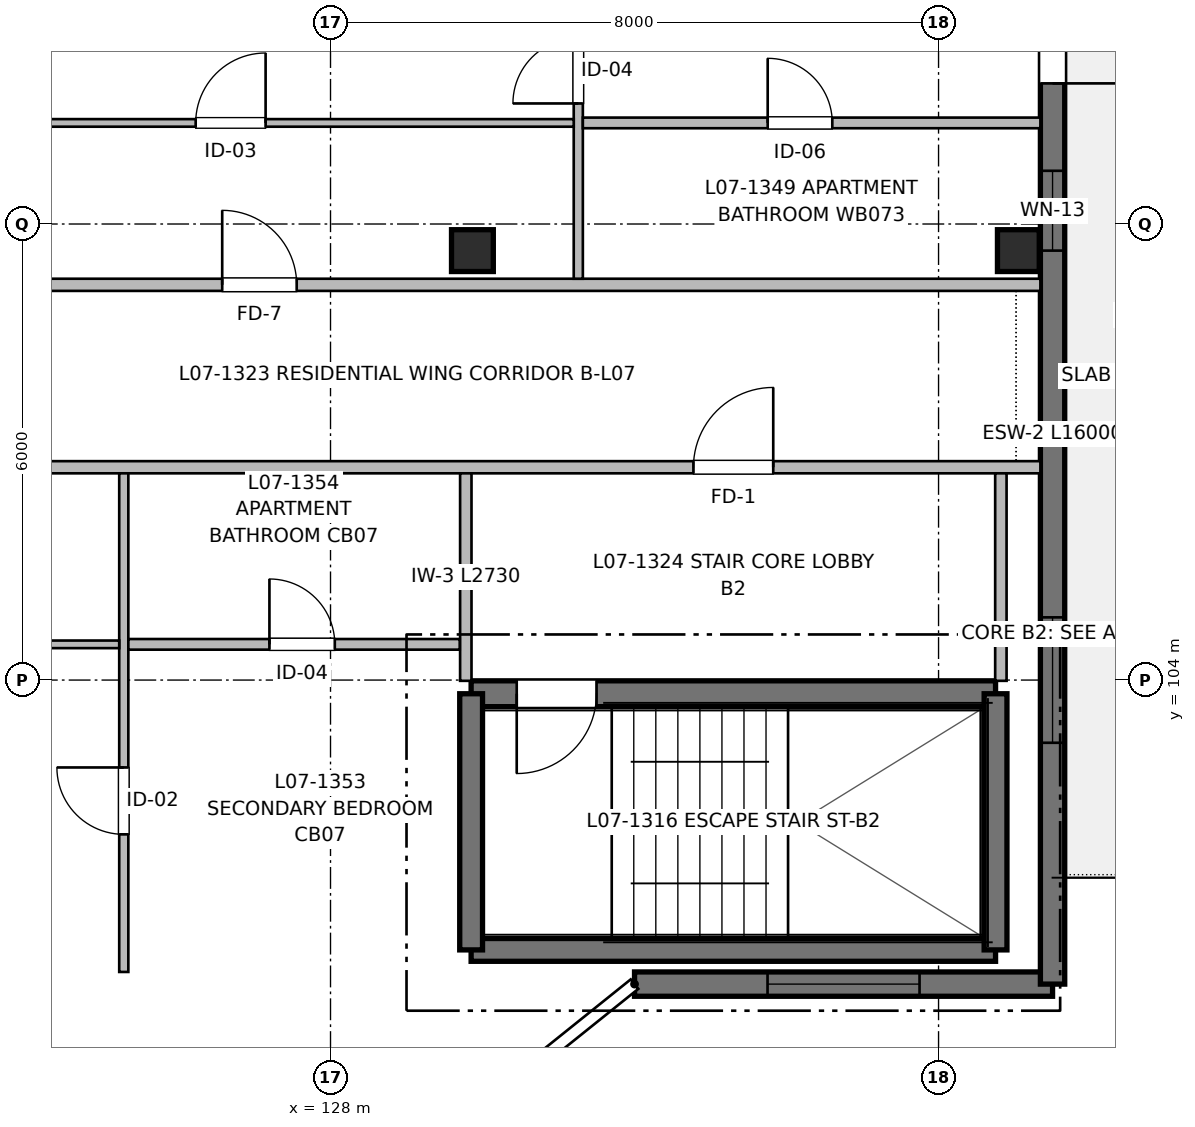
"""IFC4 building model, lengths in metres.
Left out: names, types, materials, properties, quantities, classifications, styles, units other than length and angle.
Written with IfcOpenShell. Run it as: python <this file> out.ifc"""

import sys

from ifc_helpers import new_model, si_unit, direction, frame, frame_2d, origin, origin_2d, place, context, subcontext, project, spatial, rectangle, extrude, element, fill, save


model = new_model("IFC4")
c1 = context("Model", 3, precision=1e-05, world=origin(), true_north=direction((0.0, 1.0)))
c2 = subcontext(c1, "Body", "Model", "MODEL_VIEW")
j1 = project(units=[si_unit("LENGTHUNIT", "METRE"), si_unit("PLANEANGLEUNIT", "RADIAN")], contexts=[c1])
p1 = place(None, origin())
s1 = spatial("IfcSite", under=j1, at=p1, CompositionType="ELEMENT")
p2 = place(p1, origin())
s2 = spatial("IfcBuilding", under=s1, at=p2, CompositionType="ELEMENT")
p3 = place(p2, frame((0.0, 0.0, 23.36)))
s3 = spatial("IfcBuildingStorey", under=s2, at=p3, CompositionType="ELEMENT", Elevation=23.36)
for number, where, z_axis, x_axis in (
    (1, (129.867, 109.65, 0.0), (0.0, 0.0, 1.0), (1.0, 0.0, 0.0)),
    (2, (137.05, 109.65, 0.0), (0.0, 0.0, 1.0), (1.0, 0.0, 0.0)),
):
    element("IfcColumn", number, at=place(p3, frame(where, z_axis=z_axis, x_axis=x_axis)), inside=s3, PredefinedType="COLUMN", context=c2, shape_type="SweptSolid", body=[
        extrude(rectangle(XDim=0.55, YDim=0.55, at=origin_2d()), origin(), (0.0, 0.0, 1.0), 3.2),
    ])
p4 = place(p3, frame((129.85, 100.45, 0.0), z_axis=(0.0, 0.0, 1.0), x_axis=(1.0, 0.0, 0.0)))
e3 = element("IfcWall", 3, at=p4, inside=s3, PredefinedType="SHEAR", context=c2, shape_type="SweptSolid", body=[
    extrude(rectangle(XDim=6.9, YDim=0.3, at=frame_2d((3.45, 0.0))), origin(), (0.0, 0.0, 1.0), 3.2),
])
p5 = place(p3, frame((136.75, 103.82, 0.0), z_axis=(0.0, 0.0, 1.0), x_axis=(-1.0, 0.0, 0.0)))
e4 = element("IfcWall", 4, at=p5, inside=s3, PredefinedType="SHEAR", context=c2, shape_type="SweptSolid", body=[
    extrude(rectangle(XDim=6.9, YDim=0.34, at=frame_2d((3.45, 0.0))), origin(), (0.0, 0.0, 1.0), 3.2),
])
p6 = place(p5, frame((5.25, 0.0, 0.0)))
e5 = element("IfcOpeningElement", 5, at=p6, cuts=e4, PredefinedType="OPENING", context=c2, shape_type="SweptSolid", body=[
    extrude(rectangle(XDim=1.05, YDim=2.15, at=frame_2d((0.525, 1.075))), frame((0.0, 0.18, 0.0), z_axis=(0.0, -1.0, 0.0), x_axis=(1.0, 0.0, 0.0)), (0.0, 0.0, 1.0), 0.36),
])
for number, where, z_axis, x_axis in (
    (6, (129.85, 103.82, 0.0), (0.0, 0.0, 1.0), (0.0, -1.0, 0.0)),
    (7, (136.75, 100.45, 0.0), (0.0, 0.0, 1.0), (0.0, 1.0, 0.0)),
):
    element("IfcWall", number, at=place(p3, frame(where, z_axis=z_axis, x_axis=x_axis)), inside=s3, PredefinedType="SHEAR", context=c2, shape_type="SweptSolid", body=[
        extrude(rectangle(XDim=3.37, YDim=0.3, at=frame_2d((1.685, 0.0))), origin(), (0.0, 0.0, 1.0), 3.2),
    ])
p7 = place(p3, frame((137.5, 100.0, 0.0), z_axis=(0.0, 0.0, 1.0), x_axis=(-1.0, 0.0, 0.0)))
e8 = element("IfcWall", 8, at=p7, inside=s3, PredefinedType="SHEAR", context=c2, shape_type="SweptSolid", body=[
    extrude(rectangle(XDim=5.5, YDim=0.32, at=frame_2d((2.75, 0.0))), origin(), (0.0, 0.0, 1.0), 2.98),
])
p8 = place(p7, frame((1.75, 0.0, 0.72)))
e9 = element("IfcOpeningElement", 9, at=p8, cuts=e8, PredefinedType="OPENING", context=c2, shape_type="SweptSolid", body=[
    extrude(rectangle(XDim=2.0, YDim=1.5, at=frame_2d((1.0, 0.75))), frame((0.0, 0.17, 0.0), z_axis=(0.0, -1.0, 0.0), x_axis=(1.0, 0.0, 0.0)), (0.0, 0.0, 1.0), 0.34),
])
p9 = place(p3, frame((137.5, 116.0, 0.0), z_axis=(0.0, 0.0, 1.0), x_axis=(0.0, -1.0, 0.0)))
e10 = element("IfcWall", 10, at=p9, inside=s3, PredefinedType="SHEAR", context=c2, shape_type="SweptSolid", body=[
    extrude(rectangle(XDim=16.0, YDim=0.32, at=frame_2d((8.0, 0.0))), origin(), (0.0, 0.0, 1.0), 2.98),
])
p10 = place(p9, frame((2.95, 0.0, 0.0)))
e11 = element("IfcOpeningElement", 11, at=p10, cuts=e10, PredefinedType="OPENING", context=c2, shape_type="SweptSolid", body=[
    extrude(rectangle(XDim=1.2, YDim=2.2, at=frame_2d((0.6, 1.1))), frame((0.0, 0.17, 0.0), z_axis=(0.0, -1.0, 0.0), x_axis=(1.0, 0.0, 0.0)), (0.0, 0.0, 1.0), 0.34),
])
p11 = place(p9, frame((5.3, 0.0, 0.9)))
e12 = element("IfcOpeningElement", 12, at=p11, cuts=e10, PredefinedType="OPENING", context=c2, shape_type="SweptSolid", body=[
    extrude(rectangle(XDim=1.05, YDim=1.15, at=frame_2d((0.525, 0.575))), frame((0.0, 0.17, 0.0), z_axis=(0.0, -1.0, 0.0), x_axis=(1.0, 0.0, 0.0)), (0.0, 0.0, 1.0), 0.34),
])
p12 = place(p9, frame((11.175, 0.0, 0.77)))
e13 = element("IfcOpeningElement", 13, at=p12, cuts=e10, PredefinedType="OPENING", context=c2, shape_type="SweptSolid", body=[
    extrude(rectangle(XDim=1.65, YDim=1.45, at=frame_2d((0.825, 0.725))), frame((0.0, 0.17, 0.0), z_axis=(0.0, -1.0, 0.0), x_axis=(1.0, 0.0, 0.0)), (0.0, 0.0, 1.0), 0.34),
])
p13 = place(p3, frame((113.2, 106.8, 0.0), z_axis=(0.0, 0.0, 1.0), x_axis=(1.0, 0.0, 0.0)))
e14 = element("IfcWall", 14, at=p13, inside=s3, PredefinedType="PARTITIONING", context=c2, shape_type="SweptSolid", body=[
    extrude(rectangle(XDim=24.14, YDim=0.16, at=frame_2d((12.07, 0.0))), origin(), (0.0, 0.0, 1.0), 2.935),
])
p14 = place(p13, frame((19.575, 0.0, 0.0)))
e15 = element("IfcOpeningElement", 15, at=p14, cuts=e14, PredefinedType="OPENING", context=c2, shape_type="SweptSolid", body=[
    extrude(rectangle(XDim=1.05, YDim=2.15, at=frame_2d((0.525, 1.075))), frame((0.0, 0.09, 0.0), z_axis=(0.0, -1.0, 0.0), x_axis=(1.0, 0.0, 0.0)), (0.0, 0.0, 1.0), 0.18),
])
p15 = place(p13, frame((8.995, 0.0, 0.0)))
e16 = element("IfcOpeningElement", 16, at=p15, cuts=e14, PredefinedType="OPENING", context=c2, shape_type="SweptSolid", body=[
    extrude(rectangle(XDim=0.98, YDim=2.15, at=frame_2d((0.49, 1.075))), frame((0.0, 0.09, 0.0), z_axis=(0.0, -1.0, 0.0), x_axis=(1.0, 0.0, 0.0)), (0.0, 0.0, 1.0), 0.18),
])
p16 = place(p3, frame((93.66, 109.2, 0.0), z_axis=(0.0, 0.0, 1.0), x_axis=(1.0, 0.0, 0.0)))
e17 = element("IfcWall", 17, at=p16, inside=s3, PredefinedType="PARTITIONING", context=c2, shape_type="SweptSolid", body=[
    extrude(rectangle(XDim=43.68, YDim=0.16, at=frame_2d((21.84, 0.0))), origin(), (0.0, 0.0, 1.0), 2.935),
])
p17 = place(p16, frame((3.705, 0.0, 0.0)))
e18 = element("IfcOpeningElement", 18, at=p17, cuts=e17, PredefinedType="OPENING", context=c2, shape_type="SweptSolid", body=[
    extrude(rectangle(XDim=0.98, YDim=2.15, at=frame_2d((0.49, 1.075))), frame((0.0, 0.09, 0.0), z_axis=(0.0, -1.0, 0.0), x_axis=(1.0, 0.0, 0.0)), (0.0, 0.0, 1.0), 0.18),
])
p18 = place(p16, frame((18.33, 0.0, 0.0)))
e19 = element("IfcOpeningElement", 19, at=p18, cuts=e17, PredefinedType="OPENING", context=c2, shape_type="SweptSolid", body=[
    extrude(rectangle(XDim=0.98, YDim=2.15, at=frame_2d((0.49, 1.075))), frame((0.0, 0.09, 0.0), z_axis=(0.0, -1.0, 0.0), x_axis=(1.0, 0.0, 0.0)), (0.0, 0.0, 1.0), 0.18),
])
p19 = place(p16, frame((32.915, 0.0, 0.0)))
e20 = element("IfcOpeningElement", 20, at=p19, cuts=e17, PredefinedType="OPENING", context=c2, shape_type="SweptSolid", body=[
    extrude(rectangle(XDim=0.98, YDim=2.15, at=frame_2d((0.49, 1.075))), frame((0.0, 0.09, 0.0), z_axis=(0.0, -1.0, 0.0), x_axis=(1.0, 0.0, 0.0)), (0.0, 0.0, 1.0), 0.18),
])
for number, where, z_axis, x_axis in (
    (21, (129.78, 103.99, 0.0), (0.0, 0.0, 1.0), (0.0, 1.0, 0.0)),
    (22, (136.82, 103.99, 0.0), (0.0, 0.0, 1.0), (0.0, 1.0, 0.0)),
):
    element("IfcWall", number, at=place(p3, frame(where, z_axis=z_axis, x_axis=x_axis)), inside=s3, PredefinedType="PARTITIONING", context=c2, shape_type="SweptSolid", body=[
        extrude(rectangle(XDim=2.73, YDim=0.15, at=frame_2d((1.365, 0.0))), origin(), (0.0, 0.0, 1.0), 2.935),
    ])
p20 = place(p3, frame((131.26, 109.28, 0.0), z_axis=(0.0, 0.0, 1.0), x_axis=(0.0, 1.0, 0.0)))
e23 = element("IfcWall", 23, at=p20, inside=s3, PredefinedType="PARTITIONING", context=c2, shape_type="SweptSolid", body=[
    extrude(rectangle(XDim=6.6, YDim=0.12, at=frame_2d((3.3, 0.0))), origin(), (0.0, 0.0, 1.0), 2.935),
])
p21 = place(p20, frame((2.306, 0.0, 0.0)))
e24 = element("IfcOpeningElement", 24, at=p21, cuts=e23, PredefinedType="OPENING", context=c2, shape_type="SweptSolid", body=[
    extrude(rectangle(XDim=0.86, YDim=2.1, at=frame_2d((0.43, 1.05))), frame((0.0, 0.07, 0.0), z_axis=(0.0, -1.0, 0.0), x_axis=(1.0, 0.0, 0.0)), (0.0, 0.0, 1.0), 0.14),
])
p22 = place(p20, frame((4.097, 0.0, 0.0)))
e25 = element("IfcOpeningElement", 25, at=p22, cuts=e23, PredefinedType="OPENING", context=c2, shape_type="SweptSolid", body=[
    extrude(rectangle(XDim=0.9, YDim=2.1, at=frame_2d((0.45, 1.05))), frame((0.0, 0.07, 0.0), z_axis=(0.0, -1.0, 0.0), x_axis=(1.0, 0.0, 0.0)), (0.0, 0.0, 1.0), 0.14),
])
p23 = place(p3, frame((131.32, 111.33, 0.0), z_axis=(0.0, 0.0, 1.0), x_axis=(1.0, 0.0, 0.0)))
e26 = element("IfcWall", 26, at=p23, inside=s3, PredefinedType="PARTITIONING", context=c2, shape_type="SweptSolid", body=[
    extrude(rectangle(XDim=6.02, YDim=0.14, at=frame_2d((3.01, 0.0))), origin(), (0.0, 0.0, 1.0), 2.935),
])
p24 = place(p23, frame((2.432, 0.0, 0.0)))
e27 = element("IfcOpeningElement", 27, at=p24, cuts=e26, PredefinedType="OPENING", context=c2, shape_type="SweptSolid", body=[
    extrude(rectangle(XDim=0.85, YDim=2.05, at=frame_2d((0.425, 1.025))), frame((0.0, 0.08, 0.0), z_axis=(0.0, -1.0, 0.0), x_axis=(1.0, 0.0, 0.0)), (0.0, 0.0, 1.0), 0.16),
])
p25 = place(p3, frame((122.87, 111.33, 0.0), z_axis=(0.0, 0.0, 1.0), x_axis=(1.0, 0.0, 0.0)))
e28 = element("IfcWall", 28, at=p25, inside=s3, PredefinedType="PARTITIONING", context=c2, shape_type="SweptSolid", body=[
    extrude(rectangle(XDim=8.33, YDim=0.1, at=frame_2d((4.165, 0.0))), origin(), (0.0, 0.0, 1.0), 2.935),
])
p26 = place(p25, frame((3.356, 0.0, 0.0)))
e29 = element("IfcOpeningElement", 29, at=p26, cuts=e28, PredefinedType="OPENING", context=c2, shape_type="SweptSolid", body=[
    extrude(rectangle(XDim=0.92, YDim=2.1, at=frame_2d((0.46, 1.05))), frame((0.0, 0.06, 0.0), z_axis=(0.0, -1.0, 0.0), x_axis=(1.0, 0.0, 0.0)), (0.0, 0.0, 1.0), 0.12),
])
p27 = place(p3, frame((125.28, 100.16, 0.0), z_axis=(0.0, 0.0, 1.0), x_axis=(0.0, 1.0, 0.0)))
e30 = element("IfcWall", 30, at=p27, inside=s3, PredefinedType="PARTITIONING", context=c2, shape_type="SweptSolid", body=[
    extrude(rectangle(XDim=6.56, YDim=0.12, at=frame_2d((3.28, 0.0))), origin(), (0.0, 0.0, 1.0), 2.935),
])
p28 = place(p27, frame((1.81, 0.0, 0.0)))
e31 = element("IfcOpeningElement", 31, at=p28, cuts=e30, PredefinedType="OPENING", context=c2, shape_type="SweptSolid", body=[
    extrude(rectangle(XDim=0.88, YDim=2.1, at=frame_2d((0.44, 1.05))), frame((0.0, 0.07, 0.0), z_axis=(0.0, -1.0, 0.0), x_axis=(1.0, 0.0, 0.0)), (0.0, 0.0, 1.0), 0.14),
])
p29 = place(p3, frame((125.34, 104.47, 0.0), z_axis=(0.0, 0.0, 1.0), x_axis=(1.0, 0.0, 0.0)))
e32 = element("IfcWall", 32, at=p29, inside=s3, PredefinedType="PARTITIONING", context=c2, shape_type="SweptSolid", body=[
    extrude(rectangle(XDim=4.36, YDim=0.14, at=frame_2d((2.18, 0.0))), origin(), (0.0, 0.0, 1.0), 2.935),
])
p30 = place(p29, frame((1.856, 0.0, 0.0)))
e33 = element("IfcOpeningElement", 33, at=p30, cuts=e32, PredefinedType="OPENING", context=c2, shape_type="SweptSolid", body=[
    extrude(rectangle(XDim=0.86, YDim=2.1, at=frame_2d((0.43, 1.05))), frame((0.0, 0.08, 0.0), z_axis=(0.0, -1.0, 0.0), x_axis=(1.0, 0.0, 0.0)), (0.0, 0.0, 1.0), 0.16),
])
p31 = place(p3, frame((120.09, 104.47, 0.0), z_axis=(0.0, 0.0, 1.0), x_axis=(1.0, 0.0, 0.0)))
e34 = element("IfcWall", 34, at=p31, inside=s3, PredefinedType="PARTITIONING", context=c2, shape_type="SweptSolid", body=[
    extrude(rectangle(XDim=5.13, YDim=0.1, at=frame_2d((2.565, 0.0))), origin(), (0.0, 0.0, 1.0), 2.935),
])
p32 = place(p31, frame((2.18, 0.0, 0.0)))
e35 = element("IfcOpeningElement", 35, at=p32, cuts=e34, PredefinedType="OPENING", context=c2, shape_type="SweptSolid", body=[
    extrude(rectangle(XDim=0.92, YDim=2.1, at=frame_2d((0.46, 1.05))), frame((0.0, 0.06, 0.0), z_axis=(0.0, -1.0, 0.0), x_axis=(1.0, 0.0, 0.0)), (0.0, 0.0, 1.0), 0.12),
])
p33 = place(p6, origin())
e36 = element("IfcDoor", 36, at=p33, inside=s3, OperationType="SINGLE_SWING_RIGHT", PredefinedType="DOOR", context=c2, shape_type="SweptSolid", body=[
    extrude(rectangle(XDim=1.05, YDim=2.15, at=frame_2d((0.525, 1.075))), frame((0.0, 0.025, 0.0), z_axis=(0.0, -1.0, 0.0), x_axis=(1.0, 0.0, 0.0)), (0.0, 0.0, 1.0), 0.05),
])
fill(e5, e36)
p34 = place(p8, origin())
e37 = element("IfcWindow", 37, at=p34, inside=s3, PartitioningType="SINGLE_PANEL", PredefinedType="WINDOW", context=c2, shape_type="SweptSolid", body=[
    extrude(rectangle(XDim=2.0, YDim=1.5, at=frame_2d((1.0, 0.75))), frame((0.0, 0.03, 0.0), z_axis=(0.0, -1.0, 0.0), x_axis=(1.0, 0.0, 0.0)), (0.0, 0.0, 1.0), 0.06),
])
fill(e9, e37)
p35 = place(p10, origin())
e38 = element("IfcDoor", 38, at=p35, inside=s3, OperationType="SINGLE_SWING_RIGHT", PredefinedType="DOOR", context=c2, shape_type="SweptSolid", body=[
    extrude(rectangle(XDim=1.2, YDim=2.2, at=frame_2d((0.6, 1.1))), frame((0.0, 0.025, 0.0), z_axis=(0.0, -1.0, 0.0), x_axis=(1.0, 0.0, 0.0)), (0.0, 0.0, 1.0), 0.05),
])
fill(e11, e38)
p36 = place(p11, origin())
e39 = element("IfcWindow", 39, at=p36, inside=s3, PartitioningType="SINGLE_PANEL", PredefinedType="WINDOW", context=c2, shape_type="SweptSolid", body=[
    extrude(rectangle(XDim=1.05, YDim=1.15, at=frame_2d((0.525, 0.575))), frame((0.0, 0.03, 0.0), z_axis=(0.0, -1.0, 0.0), x_axis=(1.0, 0.0, 0.0)), (0.0, 0.0, 1.0), 0.06),
])
fill(e12, e39)
p37 = place(p12, origin())
e40 = element("IfcWindow", 40, at=p37, inside=s3, PartitioningType="SINGLE_PANEL", PredefinedType="WINDOW", context=c2, shape_type="SweptSolid", body=[
    extrude(rectangle(XDim=1.65, YDim=1.45, at=frame_2d((0.825, 0.725))), frame((0.0, 0.03, 0.0), z_axis=(0.0, -1.0, 0.0), x_axis=(1.0, 0.0, 0.0)), (0.0, 0.0, 1.0), 0.06),
])
fill(e13, e40)
p38 = place(p14, origin())
e41 = element("IfcDoor", 41, at=p38, inside=s3, OperationType="SINGLE_SWING_RIGHT", PredefinedType="DOOR", context=c2, shape_type="SweptSolid", body=[
    extrude(rectangle(XDim=1.05, YDim=2.15, at=frame_2d((0.525, 1.075))), frame((0.0, 0.025, 0.0), z_axis=(0.0, -1.0, 0.0), x_axis=(1.0, 0.0, 0.0)), (0.0, 0.0, 1.0), 0.05),
])
fill(e15, e41)
p39 = place(p19, origin())
e42 = element("IfcDoor", 42, at=p39, inside=s3, OperationType="SINGLE_SWING_LEFT", PredefinedType="DOOR", context=c2, shape_type="SweptSolid", body=[
    extrude(rectangle(XDim=0.98, YDim=2.15, at=frame_2d((0.49, 1.075))), frame((0.0, 0.025, 0.0), z_axis=(0.0, -1.0, 0.0), x_axis=(1.0, 0.0, 0.0)), (0.0, 0.0, 1.0), 0.05),
])
fill(e20, e42)
p40 = place(p26, origin())
e43 = element("IfcDoor", 43, at=p40, inside=s3, OperationType="SINGLE_SWING_RIGHT", PredefinedType="DOOR", context=c2, shape_type="SweptSolid", body=[
    extrude(rectangle(XDim=0.92, YDim=2.1, at=frame_2d((0.46, 1.05))), frame((0.0, 0.025, 0.0), z_axis=(0.0, -1.0, 0.0), x_axis=(1.0, 0.0, 0.0)), (0.0, 0.0, 1.0), 0.05),
])
fill(e29, e43)
p41 = place(p21, origin())
e44 = element("IfcDoor", 44, at=p41, inside=s3, OperationType="SINGLE_SWING_LEFT", PredefinedType="DOOR", context=c2, shape_type="SweptSolid", body=[
    extrude(rectangle(XDim=0.86, YDim=2.1, at=frame_2d((0.43, 1.05))), frame((0.0, 0.025, 0.0), z_axis=(0.0, -1.0, 0.0), x_axis=(1.0, 0.0, 0.0)), (0.0, 0.0, 1.0), 0.05),
])
fill(e24, e44)
p42 = place(p24, origin())
e45 = element("IfcDoor", 45, at=p42, inside=s3, OperationType="SINGLE_SWING_LEFT", PredefinedType="DOOR", context=c2, shape_type="SweptSolid", body=[
    extrude(rectangle(XDim=0.85, YDim=2.05, at=frame_2d((0.425, 1.025))), frame((0.0, 0.025, 0.0), z_axis=(0.0, -1.0, 0.0), x_axis=(1.0, 0.0, 0.0)), (0.0, 0.0, 1.0), 0.05),
])
fill(e27, e45)
p43 = place(p28, origin())
e46 = element("IfcDoor", 46, at=p43, inside=s3, OperationType="SINGLE_SWING_RIGHT", PredefinedType="DOOR", context=c2, shape_type="SweptSolid", body=[
    extrude(rectangle(XDim=0.88, YDim=2.1, at=frame_2d((0.44, 1.05))), frame((0.0, 0.025, 0.0), z_axis=(0.0, -1.0, 0.0), x_axis=(1.0, 0.0, 0.0)), (0.0, 0.0, 1.0), 0.05),
])
fill(e31, e46)
p44 = place(p30, origin())
e47 = element("IfcDoor", 47, at=p44, inside=s3, OperationType="SINGLE_SWING_LEFT", PredefinedType="DOOR", context=c2, shape_type="SweptSolid", body=[
    extrude(rectangle(XDim=0.86, YDim=2.1, at=frame_2d((0.43, 1.05))), frame((0.0, 0.025, 0.0), z_axis=(0.0, -1.0, 0.0), x_axis=(1.0, 0.0, 0.0)), (0.0, 0.0, 1.0), 0.05),
])
fill(e33, e47)
save(model, sys.argv[1])
